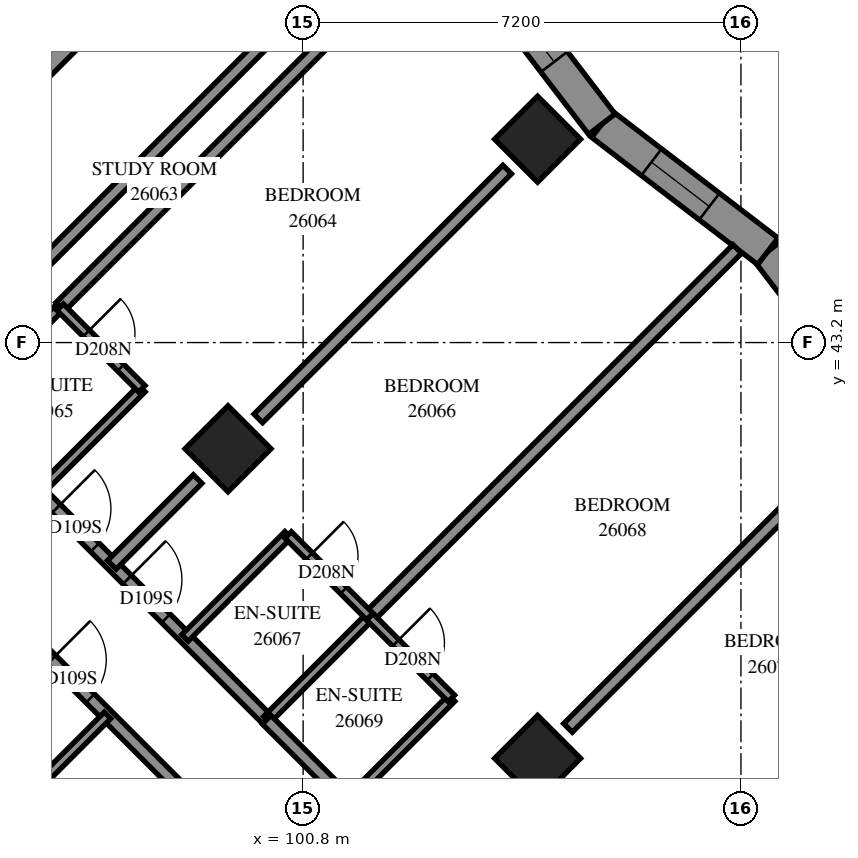
"""IFC4 building model, lengths in metres.
Left out: names, types, materials, properties, quantities, classifications, styles, units other than length and angle.
Written with IfcOpenShell. Run it as: python <this file> out.ifc"""

import sys

from ifc_helpers import new_model, si_unit, direction, frame, frame_2d, origin, origin_2d, place, context, subcontext, project, spatial, polyline, rectangle, outline, extrude, element, fill, save


model = new_model("IFC4")
c1 = context("Model", 3, precision=1e-05, world=origin(), true_north=direction((0.0, 1.0)))
c2 = subcontext(c1, "Body", "Model", "MODEL_VIEW")
j1 = project(units=[si_unit("LENGTHUNIT", "METRE"), si_unit("PLANEANGLEUNIT", "RADIAN")], contexts=[c1])
p1 = place(None, origin())
s1 = spatial("IfcSite", under=j1, at=p1, CompositionType="ELEMENT")
p2 = place(p1, origin())
s2 = spatial("IfcBuilding", under=s1, at=p2, CompositionType="ELEMENT")
p3 = place(p2, frame((0.0, 0.0, 98.2)))
s3 = spatial("IfcBuildingStorey", under=s2, at=p3, CompositionType="ELEMENT", Elevation=98.2)
for number, where, z_axis, x_axis in (
    (1, (104.656, 46.544, 0.0), (0.0, 0.0, 1.0), (0.707, -0.707, 0.0)),
    (2, (99.565, 41.453, 0.0), (0.0, 0.0, 1.0), (0.707, -0.707, 0.0)),
    (3, (104.656, 36.362, 0.0), (0.0, 0.0, 1.0), (0.707, -0.707, 0.0)),
):
    element("IfcColumn", number, at=place(p3, frame(where, z_axis=z_axis, x_axis=x_axis)), inside=s3, PredefinedType="COLUMN", context=c2, shape_type="SweptSolid", body=[
        extrude(rectangle(XDim=1.0, YDim=1.0, at=origin_2d()), origin(), (0.0, 0.0, 1.0), 3.1),
    ])
p4 = place(p3, frame((87.12, 38.625, -0.3), z_axis=(0.0, 0.0, 1.0), x_axis=(0.7071067812, 0.7071067812, 0.0)))
e4 = element("IfcWall", 4, at=p4, inside=s3, PredefinedType="SHEAR", context=c2, shape_type="SweptSolid", body=[
    extrude(rectangle(XDim=14.4, YDim=0.8, at=frame_2d((7.2, 0.0))), origin(), (0.0, 0.0, 1.0), 2.7),
])
p5 = place(p4, frame((4.55, 0.0, 0.3)))
e5 = element("IfcOpeningElement", 5, at=p5, cuts=e4, PredefinedType="OPENING", context=c2, shape_type="SweptSolid", body=[
    extrude(rectangle(XDim=1.1, YDim=2.1, at=frame_2d((0.55, 1.05))), frame((0.0, 0.41, 0.0), z_axis=(0.0, -1.0, 0.0), x_axis=(1.0, 0.0, 0.0)), (0.0, 0.0, 1.0), 0.82),
])
p6 = place(p4, frame((11.35, 0.0, 0.3)))
e6 = element("IfcOpeningElement", 6, at=p6, cuts=e4, PredefinedType="OPENING", context=c2, shape_type="SweptSolid", body=[
    extrude(rectangle(XDim=1.1, YDim=2.1, at=frame_2d((0.55, 1.05))), frame((0.0, 0.41, 0.0), z_axis=(0.0, -1.0, 0.0), x_axis=(1.0, 0.0, 0.0)), (0.0, 0.0, 1.0), 0.82),
])
p7 = place(p3, frame((110.549, 41.952, 0.0), z_axis=(0.0, 0.0, 1.0), x_axis=(-0.6082751206, 0.7937262612, 0.0)))
e7 = element("IfcWall", 7, at=p7, inside=s3, PredefinedType="SOLIDWALL", context=c2, shape_type="SweptSolid", body=[
    extrude(outline(polyline([(0.06, -0.275), (3.499, -0.275), (3.426, 0.275), (-0.06, 0.275), (0.06, -0.275)])), origin(), (0.0, 0.0, 1.0), 3.1),
])
p8 = place(p7, frame((1.113, 0.0, 0.5)))
e8 = element("IfcOpeningElement", 8, at=p8, cuts=e7, PredefinedType="OPENING", context=c2, shape_type="SweptSolid", body=[
    extrude(rectangle(XDim=1.2, YDim=2.45, at=frame_2d((0.6, 1.225))), frame((0.0, 0.285, 0.0), z_axis=(0.0, -1.0, 0.0), x_axis=(1.0, 0.0, 0.0)), (0.0, 0.0, 1.0), 0.57),
])
p9 = place(p3, frame((108.442, 44.7, 0.0), z_axis=(0.0, 0.0, 1.0), x_axis=(-0.7937392534, 0.6082581669, 0.0)))
e9 = element("IfcWall", 9, at=p9, inside=s3, PredefinedType="SOLIDWALL", context=c2, shape_type="SweptSolid", body=[
    extrude(outline(polyline([(-0.036, -0.275), (3.403, -0.275), (3.475, 0.275), (0.036, 0.275), (-0.036, -0.275)])), origin(), (0.0, 0.0, 1.0), 3.1),
])
p10 = place(p9, frame((1.212, 0.0, 0.5)))
e10 = element("IfcOpeningElement", 10, at=p10, cuts=e9, PredefinedType="OPENING", context=c2, shape_type="SweptSolid", body=[
    extrude(rectangle(XDim=1.2, YDim=2.45, at=frame_2d((0.6, 1.225))), frame((0.0, 0.285, 0.0), z_axis=(0.0, -1.0, 0.0), x_axis=(1.0, 0.0, 0.0)), (0.0, 0.0, 1.0), 0.57),
])
p11 = place(p3, frame((105.712, 46.792, 0.0), z_axis=(0.0, 0.0, 1.0), x_axis=(-0.6082581669, 0.7937392534, 0.0)))
e11 = element("IfcWall", 11, at=p11, inside=s3, PredefinedType="SOLIDWALL", context=c2, shape_type="SweptSolid", body=[
    extrude(outline(polyline([(0.036, -0.275), (3.475, -0.275), (3.403, 0.275), (-0.036, 0.275), (0.036, -0.275)])), origin(), (0.0, 0.0, 1.0), 3.1),
])
p12 = place(p11, frame((1.29, 0.0, 0.5)))
e12 = element("IfcOpeningElement", 12, at=p12, cuts=e11, PredefinedType="OPENING", context=c2, shape_type="SweptSolid", body=[
    extrude(rectangle(XDim=1.2, YDim=2.45, at=frame_2d((0.6, 1.225))), frame((0.0, 0.285, 0.0), z_axis=(0.0, -1.0, 0.0), x_axis=(1.0, 0.0, 0.0)), (0.0, 0.0, 1.0), 0.57),
])
p13 = place(p3, frame((93.339, 41.309, 0.0), z_axis=(0.0, 0.0, 1.0), x_axis=(0.7071067812, -0.7071067812, 0.0)))
e13 = element("IfcWall", 13, at=p13, inside=s3, PredefinedType="PARTITIONING", context=c2, shape_type="SweptSolid", body=[
    extrude(rectangle(XDim=18.702, YDim=0.2, at=frame_2d((9.351, 0.0))), origin(), (0.0, 0.0, 1.0), 3.1),
])
p14 = place(p13, frame((3.05, 0.0, 0.0)))
e14 = element("IfcOpeningElement", 14, at=p14, cuts=e13, PredefinedType="OPENING", context=c2, shape_type="SweptSolid", body=[
    extrude(rectangle(XDim=0.9, YDim=2.1, at=frame_2d((0.45, 1.05))), frame((0.0, 0.11, 0.0), z_axis=(0.0, -1.0, 0.0), x_axis=(1.0, 0.0, 0.0)), (0.0, 0.0, 1.0), 0.22),
])
p15 = place(p13, frame((4.7, 0.0, 0.0)))
e15 = element("IfcOpeningElement", 15, at=p15, cuts=e13, PredefinedType="OPENING", context=c2, shape_type="SweptSolid", body=[
    extrude(rectangle(XDim=0.9, YDim=2.1, at=frame_2d((0.45, 1.05))), frame((0.0, 0.11, 0.0), z_axis=(0.0, -1.0, 0.0), x_axis=(1.0, 0.0, 0.0)), (0.0, 0.0, 1.0), 0.22),
])
p16 = place(p13, frame((10.149, 0.0, 0.0)))
e16 = element("IfcOpeningElement", 16, at=p16, cuts=e13, PredefinedType="OPENING", context=c2, shape_type="SweptSolid", body=[
    extrude(rectangle(XDim=0.9, YDim=2.1, at=frame_2d((0.45, 1.05))), frame((0.0, 0.11, 0.0), z_axis=(0.0, -1.0, 0.0), x_axis=(1.0, 0.0, 0.0)), (0.0, 0.0, 1.0), 0.22),
])
p17 = place(p13, frame((11.9, 0.0, 0.0)))
e17 = element("IfcOpeningElement", 17, at=p17, cuts=e13, PredefinedType="OPENING", context=c2, shape_type="SweptSolid", body=[
    extrude(rectangle(XDim=0.9, YDim=2.1, at=frame_2d((0.45, 1.05))), frame((0.0, 0.11, 0.0), z_axis=(0.0, -1.0, 0.0), x_axis=(1.0, 0.0, 0.0)), (0.0, 0.0, 1.0), 0.22),
])
p18 = place(p13, frame((17.45, 0.0, 0.0)))
e18 = element("IfcOpeningElement", 18, at=p18, cuts=e13, PredefinedType="OPENING", context=c2, shape_type="SweptSolid", body=[
    extrude(rectangle(XDim=0.9, YDim=2.1, at=frame_2d((0.45, 1.05))), frame((0.0, 0.11, 0.0), z_axis=(0.0, -1.0, 0.0), x_axis=(1.0, 0.0, 0.0)), (0.0, 0.0, 1.0), 0.22),
])
p19 = place(p3, frame((94.615, 42.587, 0.0), z_axis=(0.0, 0.0, 1.0), x_axis=(0.7071067812, 0.7071067812, 0.0)))
e19 = element("IfcWall", 19, at=p19, inside=s3, PredefinedType="PARTITIONING", context=c2, shape_type="SweptSolid", body=[
    extrude(rectangle(XDim=9.198, YDim=0.2, at=frame_2d((4.599, 0.0))), origin(), (0.0, 0.0, 1.0), 3.1),
])
p20 = place(p19, frame((0.248, 0.0, 0.0)))
e20 = element("IfcOpeningElement", 20, at=p20, cuts=e19, PredefinedType="OPENING", context=c2, shape_type="SweptSolid", body=[
    extrude(rectangle(XDim=1.0, YDim=2.1, at=frame_2d((0.5, 1.05))), frame((0.0, 0.11, 0.0), z_axis=(0.0, -1.0, 0.0), x_axis=(1.0, 0.0, 0.0)), (0.0, 0.0, 1.0), 0.22),
])
p21 = place(p3, frame((101.896, 38.698, 0.0), z_axis=(0.0, 0.0, 1.0), x_axis=(0.7072296489, 0.7069838921, 0.0)))
e21 = element("IfcWall", 21, at=p21, inside=s3, PredefinedType="PARTITIONING", context=c2, shape_type="SweptSolid", body=[
    extrude(rectangle(XDim=8.545, YDim=0.2, at=frame_2d((4.272, 0.0))), origin(), (0.0, 0.0, 1.0), 3.1),
])
p22 = place(p3, frame((96.805, 43.787, 0.0), z_axis=(0.0, 0.0, 1.0), x_axis=(0.7071126661, 0.7071008962, 0.0)))
e22 = element("IfcWall", 22, at=p22, inside=s3, PredefinedType="PARTITIONING", context=c2, shape_type="SweptSolid", body=[
    extrude(rectangle(XDim=8.496, YDim=0.2, at=frame_2d((4.248, 0.0))), origin(), (0.0, 0.0, 1.0), 3.1),
])
p23 = place(p3, frame((94.62, 42.587, 0.0), z_axis=(0.0, 0.0, 1.0), x_axis=(0.7071067812, -0.7071067812, 0.0)))
e23 = element("IfcWall", 23, at=p23, inside=s3, PredefinedType="PARTITIONING", context=c2, shape_type="SweptSolid", body=[
    extrude(rectangle(XDim=7.9, YDim=0.2, at=frame_2d((3.95, 0.0))), origin(), (0.0, 0.0, 1.0), 3.1),
])
p24 = place(p23, frame((2.998, 0.0, 0.0)))
e24 = element("IfcOpeningElement", 24, at=p24, cuts=e23, PredefinedType="OPENING", context=c2, shape_type="SweptSolid", body=[
    extrude(rectangle(XDim=0.9, YDim=2.1, at=frame_2d((0.45, 1.05))), frame((0.0, 0.11, 0.0), z_axis=(0.0, -1.0, 0.0), x_axis=(1.0, 0.0, 0.0)), (0.0, 0.0, 1.0), 0.22),
])
p25 = place(p23, frame((4.649, 0.0, 0.0)))
e25 = element("IfcOpeningElement", 25, at=p25, cuts=e23, PredefinedType="OPENING", context=c2, shape_type="SweptSolid", body=[
    extrude(rectangle(XDim=0.9, YDim=2.1, at=frame_2d((0.45, 1.05))), frame((0.0, 0.11, 0.0), z_axis=(0.0, -1.0, 0.0), x_axis=(1.0, 0.0, 0.0)), (0.0, 0.0, 1.0), 0.22),
])
for number, where, z_axis, x_axis in (
    (26, (105.155, 36.863, 0.0), (0.0, 0.0, 1.0), (0.707, 0.707, 0.0)),
    (27, (100.063, 41.953, 0.0), (0.0, 0.0, 1.0), (0.707, 0.707, 0.0)),
):
    element("IfcWall", number, at=place(p3, frame(where, z_axis=z_axis, x_axis=x_axis)), inside=s3, PredefinedType="PARTITIONING", context=c2, shape_type="SweptSolid", body=[
        extrude(rectangle(XDim=5.787, YDim=0.2, at=frame_2d((2.893, 0.0))), origin(), (0.0, 0.0, 1.0), 3.1),
    ])
p26 = place(p3, frame((106.989, 33.605, 0.0), z_axis=(0.0, 0.0, 1.0), x_axis=(0.7071067812, 0.7071067812, 0.0)))
e28 = element("IfcWall", 28, at=p26, inside=s3, PredefinedType="PARTITIONING", context=c2, shape_type="SweptSolid", body=[
    extrude(rectangle(XDim=3.35, YDim=0.2, at=frame_2d((1.675, 0.0))), origin(), (0.0, 0.0, 1.0), 3.1),
])
p27 = place(p3, frame((100.203, 36.997, 0.0), z_axis=(0.0, 0.0, 1.0), x_axis=(0.706689978, 0.7075233388, 0.0)))
e29 = element("IfcWall", 29, at=p27, inside=s3, PredefinedType="PARTITIONING", context=c2, shape_type="SweptSolid", body=[
    extrude(rectangle(XDim=2.4, YDim=0.15, at=frame_2d((1.2, 0.0))), origin(), (0.0, 0.0, 1.0), 3.1),
])
for number, where, z_axis, x_axis in (
    (30, (96.453, 40.747, 0.0), (0.0, 0.0, 1.0), (0.707, 0.707, 0.0)),
    (31, (95.109, 42.091, 0.0), (0.0, 0.0, 1.0), (0.707, 0.707, 0.0)),
    (32, (95.887, 35.373, 0.0), (0.0, 0.0, 1.0), (0.707, 0.707, 0.0)),
    (33, (98.857, 38.343, 0.0), (0.0, 0.0, 1.0), (0.707, 0.707, 0.0)),
    (34, (101.545, 35.657, 0.0), (0.0, 0.0, 1.0), (0.707, 0.707, 0.0)),
):
    element("IfcWall", number, at=place(p3, frame(where, z_axis=z_axis, x_axis=x_axis)), inside=s3, PredefinedType="PARTITIONING", context=c2, shape_type="SweptSolid", body=[
        extrude(rectangle(XDim=2.398, YDim=0.15, at=frame_2d((1.199, 0.0))), origin(), (0.0, 0.0, 1.0), 3.1),
    ])
p28 = place(p3, frame((97.655, 39.545, 0.0), z_axis=(0.0, 0.0, 1.0), x_axis=(0.7071067812, 0.7071067812, 0.0)))
e35 = element("IfcWall", 35, at=p28, inside=s3, PredefinedType="PARTITIONING", context=c2, shape_type="SweptSolid", body=[
    extrude(rectangle(XDim=1.994, YDim=0.2, at=frame_2d((0.997, 0.0))), origin(), (0.0, 0.0, 1.0), 3.1),
])
p29 = place(p3, frame((96.803, 43.783, 0.0), z_axis=(0.0, 0.0, 1.0), x_axis=(0.7071067812, -0.7071067812, 0.0)))
e36 = element("IfcWall", 36, at=p29, inside=s3, PredefinedType="PARTITIONING", context=c2, shape_type="SweptSolid", body=[
    extrude(rectangle(XDim=1.901, YDim=0.15, at=frame_2d((0.95, 0.0))), origin(), (0.0, 0.0, 1.0), 3.1),
])
p30 = place(p29, frame((0.609, 0.0, 0.0)))
e37 = element("IfcOpeningElement", 37, at=p30, cuts=e36, PredefinedType="OPENING", context=c2, shape_type="SweptSolid", body=[
    extrude(rectangle(XDim=0.8, YDim=2.1, at=frame_2d((0.4, 1.05))), frame((0.0, 0.085, 0.0), z_axis=(0.0, -1.0, 0.0), x_axis=(1.0, 0.0, 0.0)), (0.0, 0.0, 1.0), 0.17),
])
p31 = place(p3, frame((101.894, 38.693, 0.0), z_axis=(0.0, 0.0, 1.0), x_axis=(0.7071067812, -0.7071067812, 0.0)))
e38 = element("IfcWall", 38, at=p31, inside=s3, PredefinedType="PARTITIONING", context=c2, shape_type="SweptSolid", body=[
    extrude(rectangle(XDim=1.901, YDim=0.15, at=frame_2d((0.95, 0.0))), origin(), (0.0, 0.0, 1.0), 3.1),
])
p32 = place(p31, frame((0.608, 0.0, 0.0)))
e39 = element("IfcOpeningElement", 39, at=p32, cuts=e38, PredefinedType="OPENING", context=c2, shape_type="SweptSolid", body=[
    extrude(rectangle(XDim=0.8, YDim=2.1, at=frame_2d((0.4, 1.05))), frame((0.0, 0.085, 0.0), z_axis=(0.0, -1.0, 0.0), x_axis=(1.0, 0.0, 0.0)), (0.0, 0.0, 1.0), 0.17),
])
p33 = place(p3, frame((100.553, 40.037, 0.0), z_axis=(0.0, 0.0, 1.0), x_axis=(0.7076330979, -0.7065800724, 0.0)))
e40 = element("IfcWall", 40, at=p33, inside=s3, PredefinedType="PARTITIONING", context=c2, shape_type="SweptSolid", body=[
    extrude(rectangle(XDim=1.899, YDim=0.15, at=frame_2d((0.95, 0.0))), origin(), (0.0, 0.0, 1.0), 3.1),
])
p34 = place(p33, frame((0.493, 0.0, 0.0)))
e41 = element("IfcOpeningElement", 41, at=p34, cuts=e40, PredefinedType="OPENING", context=c2, shape_type="SweptSolid", body=[
    extrude(rectangle(XDim=0.8, YDim=2.1, at=frame_2d((0.4, 1.05))), frame((0.0, 0.085, 0.0), z_axis=(0.0, -1.0, 0.0), x_axis=(1.0, 0.0, 0.0)), (0.0, 0.0, 1.0), 0.17),
])
p35 = place(p3, frame((100.201, 36.997, 0.0), z_axis=(0.0, 0.0, 1.0), x_axis=(0.7076330979, -0.7065800724, 0.0)))
e42 = element("IfcWall", 42, at=p35, inside=s3, PredefinedType="PARTITIONING", context=c2, shape_type="SweptSolid", body=[
    extrude(rectangle(XDim=1.899, YDim=0.2, at=frame_2d((0.95, 0.0))), origin(), (0.0, 0.0, 1.0), 3.1),
])
p36 = place(p10, origin())
e43 = element("IfcWindow", 43, at=p36, inside=s3, PartitioningType="SINGLE_PANEL", PredefinedType="WINDOW", context=c2, shape_type="SweptSolid", body=[
    extrude(rectangle(XDim=1.2, YDim=2.45, at=frame_2d((0.6, 1.225))), frame((0.0, 0.155, 0.0), z_axis=(0.0, -1.0, 0.0), x_axis=(1.0, 0.0, 0.0)), (0.0, 0.0, 1.0), 0.06),
])
fill(e10, e43)
p37 = place(p12, origin())
e44 = element("IfcWindow", 44, at=p37, inside=s3, PartitioningType="SINGLE_PANEL", PredefinedType="WINDOW", context=c2, shape_type="SweptSolid", body=[
    extrude(rectangle(XDim=1.2, YDim=2.45, at=frame_2d((0.6, 1.225))), frame((0.0, 0.155, 0.0), z_axis=(0.0, -1.0, 0.0), x_axis=(1.0, 0.0, 0.0)), (0.0, 0.0, 1.0), 0.06),
])
fill(e12, e44)
p38 = place(p24, origin())
e45 = element("IfcDoor", 45, at=p38, inside=s3, OperationType="SINGLE_SWING_RIGHT", PredefinedType="DOOR", context=c2, shape_type="SweptSolid", body=[
    extrude(rectangle(XDim=0.9, YDim=2.1, at=frame_2d((0.45, 1.05))), frame((0.0, 0.025, 0.0), z_axis=(0.0, -1.0, 0.0), x_axis=(1.0, 0.0, 0.0)), (0.0, 0.0, 1.0), 0.05),
])
fill(e24, e45)
p39 = place(p30, origin())
e46 = element("IfcDoor", 46, at=p39, inside=s3, OperationType="SINGLE_SWING_RIGHT", PredefinedType="DOOR", context=c2, shape_type="SweptSolid", body=[
    extrude(rectangle(XDim=0.8, YDim=2.1, at=frame_2d((0.4, 1.05))), frame((0.0, 0.025, 0.0), z_axis=(0.0, -1.0, 0.0), x_axis=(1.0, 0.0, 0.0)), (0.0, 0.0, 1.0), 0.05),
])
fill(e37, e46)
p40 = place(p25, origin())
e47 = element("IfcDoor", 47, at=p40, inside=s3, OperationType="SINGLE_SWING_LEFT", PredefinedType="DOOR", context=c2, shape_type="SweptSolid", body=[
    extrude(rectangle(XDim=0.9, YDim=2.1, at=frame_2d((0.45, 1.05))), frame((0.0, 0.025, 0.0), z_axis=(0.0, -1.0, 0.0), x_axis=(1.0, 0.0, 0.0)), (0.0, 0.0, 1.0), 0.05),
])
fill(e25, e47)
p41 = place(p34, origin())
e48 = element("IfcDoor", 48, at=p41, inside=s3, OperationType="SINGLE_SWING_RIGHT", PredefinedType="DOOR", context=c2, shape_type="SweptSolid", body=[
    extrude(rectangle(XDim=0.8, YDim=2.1, at=frame_2d((0.4, 1.05))), frame((0.0, 0.025, 0.0), z_axis=(0.0, -1.0, 0.0), x_axis=(1.0, 0.0, 0.0)), (0.0, 0.0, 1.0), 0.05),
])
fill(e41, e48)
p42 = place(p32, origin())
e49 = element("IfcDoor", 49, at=p42, inside=s3, OperationType="SINGLE_SWING_RIGHT", PredefinedType="DOOR", context=c2, shape_type="SweptSolid", body=[
    extrude(rectangle(XDim=0.8, YDim=2.1, at=frame_2d((0.4, 1.05))), frame((0.0, 0.025, 0.0), z_axis=(0.0, -1.0, 0.0), x_axis=(1.0, 0.0, 0.0)), (0.0, 0.0, 1.0), 0.05),
])
fill(e39, e49)
p43 = place(p15, origin())
e50 = element("IfcDoor", 50, at=p43, inside=s3, OperationType="SINGLE_SWING_RIGHT", PredefinedType="DOOR", context=c2, shape_type="SweptSolid", body=[
    extrude(rectangle(XDim=0.9, YDim=2.1, at=frame_2d((0.45, 1.05))), frame((0.0, 0.025, 0.0), z_axis=(0.0, -1.0, 0.0), x_axis=(1.0, 0.0, 0.0)), (0.0, 0.0, 1.0), 0.05),
])
fill(e15, e50)
save(model, sys.argv[1])
